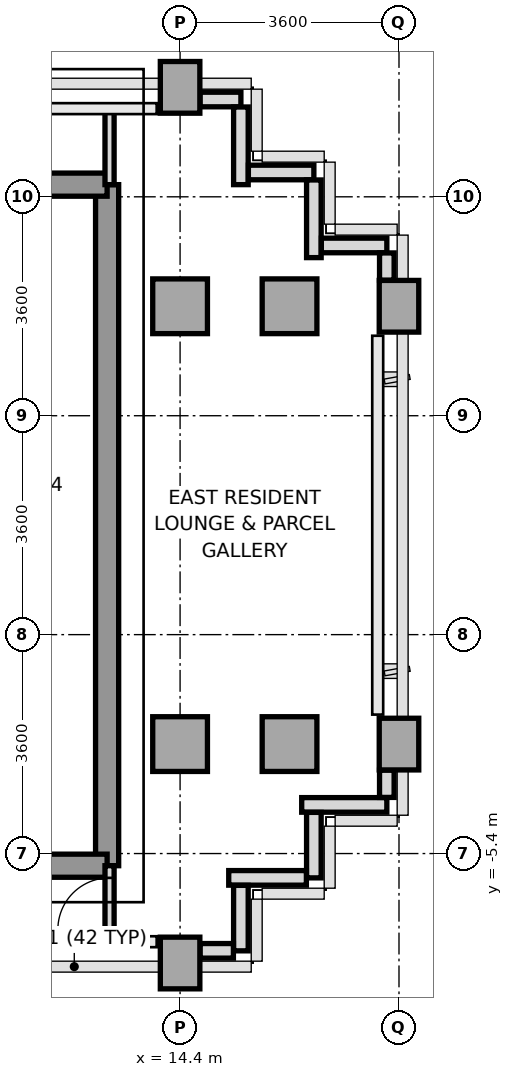
"""IFC4 building model, lengths in metres.
Left out: names, types, materials, properties, quantities, classifications, styles, units other than length and angle.
Written with IfcOpenShell. Run it as: python <this file> out.ifc"""

import sys

from ifc_helpers import new_model, si_unit, direction, frame, frame_2d, origin, origin_2d, place, context, subcontext, project, spatial, rectangle, extrude, source, transform, mapped, element, fill, save


model = new_model("IFC4")
c1 = context("Model", 3, precision=1e-05, world=origin(), true_north=direction((0.0, 1.0)))
c2 = subcontext(c1, "Body", "Model", "MODEL_VIEW")
j1 = project(units=[si_unit("LENGTHUNIT", "METRE"), si_unit("PLANEANGLEUNIT", "RADIAN")], contexts=[c1])
p1 = place(None, origin())
s1 = spatial("IfcSite", under=j1, at=p1, CompositionType="ELEMENT")
p2 = place(p1, origin())
s2 = spatial("IfcBuilding", under=s1, at=p2, CompositionType="ELEMENT")
p3 = place(p2, frame((0.0, 0.0, 204.6)))
s3 = spatial("IfcBuildingStorey", under=s2, at=p3, CompositionType="ELEMENT", Elevation=204.6)
m1 = source(origin(), c2, "Body", "SweptSolid", [
    extrude(rectangle(XDim=0.65, YDim=0.85, at=origin_2d()), origin(), (0.0, 0.0, 1.0), 3.2),
])
p4 = place(p3, frame((14.4, -7.2, 0.0), z_axis=(0.0, 0.0, 1.0), x_axis=(1.0, 0.0, 0.0)))
e1 = element("IfcColumn", 1, at=p4, inside=s3, PredefinedType="COLUMN", context=c2, shape_type="MappedRepresentation", body=[
    mapped(m1, transform((0.0, 0.0, 0.0), x_axis=(1.0, 0.0, 0.0), y_axis=(0.0, 1.0, 0.0), z_axis=(0.0, 0.0, 1.0), scale=1.0)),
])
m2 = source(origin(), c2, "Body", "SweptSolid", [
    extrude(rectangle(XDim=0.9, YDim=0.9, at=origin_2d()), origin(), (0.0, 0.0, 1.0), 3.2),
])
for number, where, z_axis, x_axis in (
    (2, (14.4, -3.6, 0.0), (0.0, 0.0, 1.0), (1.0, 0.0, 0.0)),
    (3, (14.4, 3.6, 0.0), (0.0, 0.0, 1.0), (1.0, 0.0, 0.0)),
):
    element("IfcColumn", number, at=place(p3, frame(where, z_axis=z_axis, x_axis=x_axis)), inside=s3, PredefinedType="COLUMN", context=c2, shape_type="MappedRepresentation", body=[
        mapped(m2, transform((0.0, 0.0, 0.0), x_axis=(1.0, 0.0, 0.0), y_axis=(0.0, 1.0, 0.0), z_axis=(0.0, 0.0, 1.0), scale=1.0)),
    ])
p5 = place(p3, frame((14.4, 7.2, 0.0), z_axis=(0.0, 0.0, 1.0), x_axis=(1.0, 0.0, 0.0)))
e4 = element("IfcColumn", 4, at=p5, inside=s3, PredefinedType="COLUMN", context=c2, shape_type="MappedRepresentation", body=[
    mapped(m1, transform((0.0, 0.0, 0.0), x_axis=(1.0, 0.0, 0.0), y_axis=(0.0, 1.0, 0.0), z_axis=(0.0, 0.0, 1.0), scale=1.0)),
])
for number, where, z_axis, x_axis in (
    (5, (16.2, -3.6, 0.0), (0.0, 0.0, 1.0), (1.0, 0.0, 0.0)),
    (6, (16.2, 3.6, 0.0), (0.0, 0.0, 1.0), (1.0, 0.0, 0.0)),
):
    element("IfcColumn", number, at=place(p3, frame(where, z_axis=z_axis, x_axis=x_axis)), inside=s3, PredefinedType="COLUMN", context=c2, shape_type="MappedRepresentation", body=[
        mapped(m2, transform((0.0, 0.0, 0.0), x_axis=(1.0, 0.0, 0.0), y_axis=(0.0, 1.0, 0.0), z_axis=(0.0, 0.0, 1.0), scale=1.0)),
    ])
for number, where, z_axis, x_axis in (
    (7, (18.0, -3.6, 0.0), (0.0, 0.0, 1.0), (1.0, 0.0, 0.0)),
    (8, (18.0, 3.6, 0.0), (0.0, 0.0, 1.0), (1.0, 0.0, 0.0)),
):
    element("IfcColumn", number, at=place(p3, frame(where, z_axis=z_axis, x_axis=x_axis)), inside=s3, PredefinedType="COLUMN", context=c2, shape_type="MappedRepresentation", body=[
        mapped(m1, transform((0.0, 0.0, 0.0), x_axis=(1.0, 0.0, 0.0), y_axis=(0.0, 1.0, 0.0), z_axis=(0.0, 0.0, 1.0), scale=1.0)),
    ])
p6 = place(p3, frame((17.8, -4.6, 0.0), z_axis=(0.0, 0.0, 1.0), x_axis=(-1.0, 0.0, 0.0)))
e9 = element("IfcWall", 9, at=p6, inside=s3, PredefinedType="PARAPET", context=c2, shape_type="SweptSolid", body=[
    extrude(rectangle(XDim=1.4, YDim=0.24, at=frame_2d((0.7, 0.0))), origin(), (0.0, 0.0, 1.0), 1.15),
])
p7 = place(p3, frame((16.6, -4.723, 0.0), z_axis=(0.0, 0.0, 1.0), x_axis=(0.0, -1.0, 0.0)))
e10 = element("IfcWall", 10, at=p7, inside=s3, PredefinedType="PARAPET", context=c2, shape_type="SweptSolid", body=[
    extrude(rectangle(XDim=1.077, YDim=0.24, at=frame_2d((0.539, 0.0))), origin(), (0.0, 0.0, 1.0), 1.15),
])
p8 = place(p3, frame((16.477, -5.8, 0.0), z_axis=(0.0, 0.0, 1.0), x_axis=(-1.0, 0.0, 0.0)))
e11 = element("IfcWall", 11, at=p8, inside=s3, PredefinedType="PARAPET", context=c2, shape_type="SweptSolid", body=[
    extrude(rectangle(XDim=1.277, YDim=0.24, at=frame_2d((0.639, 0.0))), origin(), (0.0, 0.0, 1.0), 1.15),
])
p9 = place(p3, frame((15.4, -5.923, 0.0), z_axis=(0.0, 0.0, 1.0), x_axis=(0.0, -1.0, 0.0)))
e12 = element("IfcWall", 12, at=p9, inside=s3, PredefinedType="PARAPET", context=c2, shape_type="SweptSolid", body=[
    extrude(rectangle(XDim=1.077, YDim=0.24, at=frame_2d((0.539, 0.0))), origin(), (0.0, 0.0, 1.0), 1.15),
])
p10 = place(p3, frame((15.277, -7.0, 0.0), z_axis=(0.0, 0.0, 1.0), x_axis=(-1.0, 0.0, 0.0)))
e13 = element("IfcWall", 13, at=p10, inside=s3, PredefinedType="PARAPET", context=c2, shape_type="SweptSolid", body=[
    extrude(rectangle(XDim=0.549, YDim=0.24, at=frame_2d((0.274, 0.0))), origin(), (0.0, 0.0, 1.0), 1.15),
])
p11 = place(p3, frame((14.728, 7.0, 0.0), z_axis=(0.0, 0.0, 1.0), x_axis=(1.0, 0.0, 0.0)))
e14 = element("IfcWall", 14, at=p11, inside=s3, PredefinedType="PARAPET", context=c2, shape_type="SweptSolid", body=[
    extrude(rectangle(XDim=0.672, YDim=0.24, at=frame_2d((0.336, 0.0))), origin(), (0.0, 0.0, 1.0), 1.15),
])
p12 = place(p3, frame((15.4, 6.877, 0.0), z_axis=(0.0, 0.0, 1.0), x_axis=(0.0, -1.0, 0.0)))
e15 = element("IfcWall", 15, at=p12, inside=s3, PredefinedType="PARAPET", context=c2, shape_type="SweptSolid", body=[
    extrude(rectangle(XDim=1.277, YDim=0.24, at=frame_2d((0.638, 0.0))), origin(), (0.0, 0.0, 1.0), 1.15),
])
p13 = place(p3, frame((15.523, 5.8, 0.0), z_axis=(0.0, 0.0, 1.0), x_axis=(1.0, 0.0, 0.0)))
e16 = element("IfcWall", 16, at=p13, inside=s3, PredefinedType="PARAPET", context=c2, shape_type="SweptSolid", body=[
    extrude(rectangle(XDim=1.077, YDim=0.24, at=frame_2d((0.539, 0.0))), origin(), (0.0, 0.0, 1.0), 1.15),
])
p14 = place(p3, frame((16.6, 5.677, 0.0), z_axis=(0.0, 0.0, 1.0), x_axis=(0.0, -1.0, 0.0)))
e17 = element("IfcWall", 17, at=p14, inside=s3, PredefinedType="PARAPET", context=c2, shape_type="SweptSolid", body=[
    extrude(rectangle(XDim=1.277, YDim=0.24, at=frame_2d((0.639, 0.0))), origin(), (0.0, 0.0, 1.0), 1.15),
])
p15 = place(p3, frame((16.723, 4.6, 0.0), z_axis=(0.0, 0.0, 1.0), x_axis=(1.0, 0.0, 0.0)))
e18 = element("IfcWall", 18, at=p15, inside=s3, PredefinedType="PARAPET", context=c2, shape_type="SweptSolid", body=[
    extrude(rectangle(XDim=1.077, YDim=0.24, at=frame_2d((0.539, 0.0))), origin(), (0.0, 0.0, 1.0), 1.15),
])
for number, where, z_axis, x_axis in (
    (19, (17.8, 4.477, 0.0), (0.0, 0.0, 1.0), (0.0, -1.0, 0.0)),
    (20, (17.8, -4.028, 0.0), (0.0, 0.0, 1.0), (0.0, -1.0, 0.0)),
):
    element("IfcWall", number, at=place(p3, frame(where, z_axis=z_axis, x_axis=x_axis)), inside=s3, PredefinedType="PARAPET", context=c2, shape_type="SweptSolid", body=[
        extrude(rectangle(XDim=0.449, YDim=0.24, at=frame_2d((0.225, 0.0))), origin(), (0.0, 0.0, 1.0), 1.15),
    ])
p16 = place(p3, frame((13.2, -5.6, 0.0), z_axis=(0.0, 0.0, 1.0), x_axis=(0.0, 1.0, 0.0)))
e21 = element("IfcWall", 21, at=p16, inside=s3, PredefinedType="SHEAR", context=c2, shape_type="SweptSolid", body=[
    extrude(rectangle(XDim=11.2, YDim=0.38, at=frame_2d((5.6, 0.0))), origin(), (0.0, 0.0, 1.0), 3.2),
])
p17 = place(p3, frame((11.356, 5.6, 0.0), z_axis=(0.0, 0.0, 1.0), x_axis=(1.0, 0.0, 0.0)))
e22 = element("IfcWall", 22, at=p17, inside=s3, PredefinedType="SHEAR", context=c2, shape_type="SweptSolid", body=[
    extrude(rectangle(XDim=1.844, YDim=0.38, at=frame_2d((0.922, 0.0))), origin(), (0.0, 0.0, 1.0), 3.2),
])
p18 = place(p3, frame((5.4, -5.6, 0.0), z_axis=(0.0, 0.0, 1.0), x_axis=(1.0, 0.0, 0.0)))
e23 = element("IfcWall", 23, at=p18, inside=s3, PredefinedType="SHEAR", context=c2, shape_type="SweptSolid", body=[
    extrude(rectangle(XDim=7.8, YDim=0.38, at=frame_2d((3.9, 0.0))), origin(), (0.0, 0.0, 1.0), 3.2),
])
p19 = place(p3, frame((13.24, 5.6, 0.0), z_axis=(0.0, 0.0, 1.0), x_axis=(0.0, 1.0, 0.0)))
e24 = element("IfcWall", 24, at=p19, inside=s3, PredefinedType="PARTITIONING", context=c2, shape_type="SweptSolid", body=[
    extrude(rectangle(XDim=1.25, YDim=0.15, at=frame_2d((0.625, 0.0))), origin(), (0.0, 0.0, 1.0), 3.2),
])
p20 = place(p3, frame((13.24, -6.85, 0.0), z_axis=(0.0, 0.0, 1.0), x_axis=(0.0, 1.0, 0.0)))
e25 = element("IfcWall", 25, at=p20, inside=s3, PredefinedType="PARTITIONING", context=c2, shape_type="SweptSolid", body=[
    extrude(rectangle(XDim=1.25, YDim=0.15, at=frame_2d((0.625, 0.0))), origin(), (0.0, 0.0, 1.0), 3.2),
])
p21 = place(p20, frame((0.2, 0.0, 0.0)))
e26 = element("IfcOpeningElement", 26, at=p21, cuts=e25, PredefinedType="OPENING", context=c2, shape_type="SweptSolid", body=[
    extrude(rectangle(XDim=0.85, YDim=2.1, at=frame_2d((0.425, 1.05))), frame((0.0, 0.085, 0.0), z_axis=(0.0, -1.0, 0.0), x_axis=(1.0, 0.0, 0.0)), (0.0, 0.0, 1.0), 0.17),
])
m3 = source(origin(), c2, "Body", "SweptSolid", [
    extrude(rectangle(XDim=0.85, YDim=2.1, at=frame_2d((0.425, 1.05))), frame((0.0, 0.025, 0.0), z_axis=(0.0, -1.0, 0.0), x_axis=(1.0, 0.0, 0.0)), (0.0, 0.0, 1.0), 0.05),
])
p22 = place(p21, origin())
e27 = element("IfcDoor", 27, at=p22, inside=s3, OperationType="SINGLE_SWING_LEFT", PredefinedType="DOOR", context=c2, shape_type="MappedRepresentation", body=[
    mapped(m3, transform((0.0, 0.0, 0.0), x_axis=(1.0, 0.0, 0.0), y_axis=(0.0, 1.0, 0.0), z_axis=(0.0, 0.0, 1.0), scale=1.0)),
])
fill(e26, e27)
save(model, sys.argv[1])
